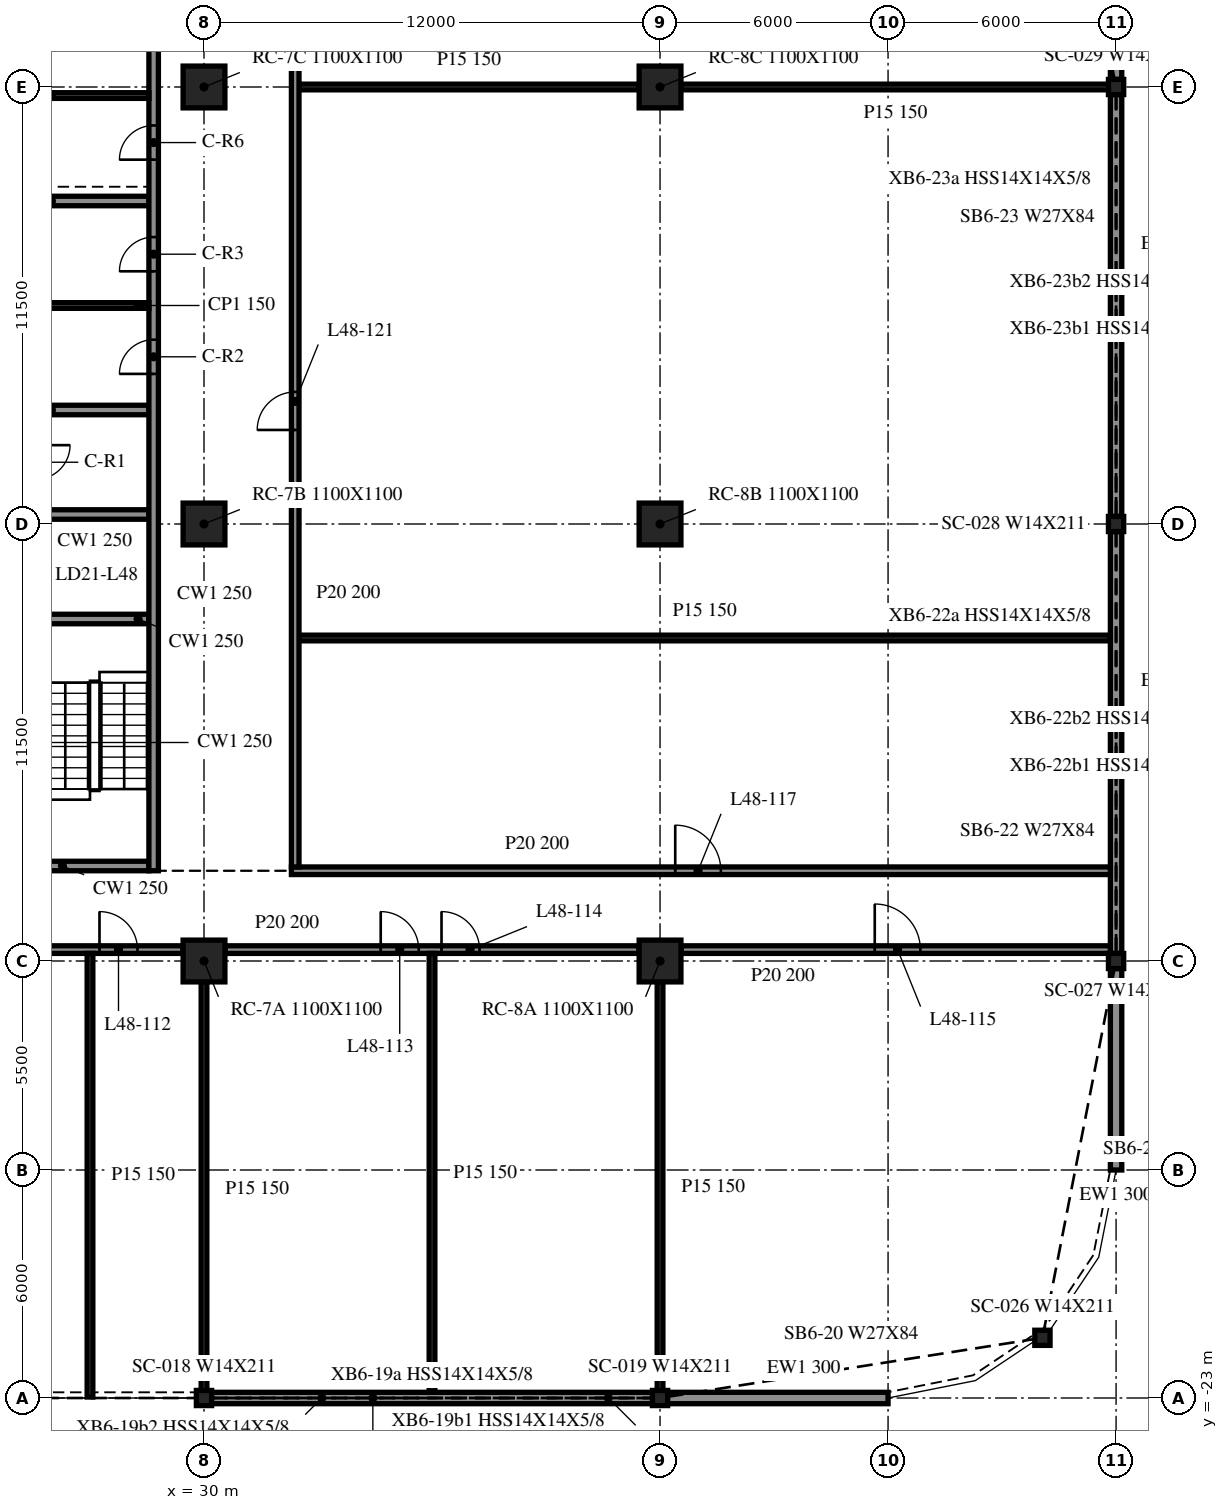
"""IFC4 building model, lengths in metres.
Left out: names, types, materials, properties, quantities, classifications, styles, units other than length and angle.
Written with IfcOpenShell. Run it as: python <this file> out.ifc"""

import sys

from ifc_helpers import new_model, si_unit, direction, frame, frame_2d, origin, origin_2d, place, context, subcontext, project, spatial, rectangle, i_section, extrude, element, fill, save


model = new_model("IFC4")
c1 = context("Model", 3, precision=1e-05, world=origin(), true_north=direction((0.0, 1.0)))
c2 = subcontext(c1, "Body", "Model", "MODEL_VIEW")
j1 = project(units=[si_unit("LENGTHUNIT", "METRE"), si_unit("PLANEANGLEUNIT", "RADIAN")], contexts=[c1])
p1 = place(None, origin())
s1 = spatial("IfcSite", under=j1, at=p1, CompositionType="ELEMENT")
p2 = place(p1, origin())
s2 = spatial("IfcBuilding", under=s1, at=p2, CompositionType="ELEMENT")
p3 = place(p2, frame((0.0, 0.0, 201.5)))
s3 = spatial("IfcBuildingStorey", under=s2, at=p3, CompositionType="ELEMENT", Elevation=201.5)
for number, where, z_axis, x_axis in (
    (1, (30.0, -11.5, -0.34), (0.0, 0.0, 1.0), (1.0, 0.0, 0.0)),
    (2, (30.0, 0.0, -0.34), (0.0, 0.0, 1.0), (1.0, 0.0, 0.0)),
    (3, (30.0, 11.5, -0.34), (0.0, 0.0, 1.0), (1.0, 0.0, 0.0)),
    (4, (42.0, -11.5, -0.34), (0.0, 0.0, 1.0), (1.0, 0.0, 0.0)),
    (5, (42.0, 0.0, -0.34), (0.0, 0.0, 1.0), (1.0, 0.0, 0.0)),
    (6, (42.0, 11.5, -0.34), (0.0, 0.0, 1.0), (1.0, 0.0, 0.0)),
):
    element("IfcColumn", number, at=place(p3, frame(where, z_axis=z_axis, x_axis=x_axis)), inside=s3, PredefinedType="COLUMN", context=c2, shape_type="SweptSolid", body=[
        extrude(rectangle(XDim=1.1, YDim=1.1, at=origin_2d()), origin(), (0.0, 0.0, 1.0), 3.8),
    ])
for number, where, z_axis, x_axis in (
    (7, (30.0, -23.0, -0.34), (0.0, 0.0, 1.0), (1.0, 0.0, 0.0)),
    (8, (42.0, -23.0, -0.34), (0.0, 0.0, 1.0), (1.0, 0.0, 0.0)),
    (9, (52.062, -21.416, -0.34), (0.0, 0.0, 1.0), (1.0, 0.0, 0.0)),
    (10, (54.0, -11.5, -0.34), (0.0, 0.0, 1.0), (1.0, 0.0, 0.0)),
    (11, (54.0, 0.0, -0.34), (0.0, 0.0, 1.0), (1.0, 0.0, 0.0)),
    (12, (54.0, 11.5, -0.34), (0.0, 0.0, 1.0), (1.0, 0.0, 0.0)),
):
    element("IfcColumn", number, at=place(p3, frame(where, z_axis=z_axis, x_axis=x_axis)), inside=s3, PredefinedType="COLUMN", context=c2, shape_type="SweptSolid", body=[
        extrude(i_section(OverallWidth=0.401, OverallDepth=0.399, WebThickness=0.025, FlangeThickness=0.04, at=origin_2d()), origin(), (0.0, 0.0, 1.0), 3.8),
    ])
p4 = place(p3, frame((30.012, -23.0, 0.0), z_axis=(0.0, 0.0, 1.0), x_axis=(1.0, 0.0, 0.0)))
e13 = element("IfcWall", 13, at=p4, inside=s3, PredefinedType="NOTDEFINED", context=c2, shape_type="SweptSolid", body=[
    extrude(rectangle(XDim=11.975, YDim=0.3, at=frame_2d((5.988, 0.0))), origin(), (0.0, 0.0, 1.0), 2.782),
])
p5 = place(p3, frame((42.012, -23.0, 0.0), z_axis=(0.0, 0.0, 1.0), x_axis=(1.0, 0.0, 0.0)))
e14 = element("IfcWall", 14, at=p5, inside=s3, PredefinedType="NOTDEFINED", context=c2, shape_type="SweptSolid", body=[
    extrude(rectangle(XDim=5.988, YDim=0.3, at=frame_2d((2.994, 0.0))), origin(), (0.0, 0.0, 1.0), 2.782),
])
p6 = place(p3, frame((54.0, -17.0, 0.0), z_axis=(0.0, 0.0, 1.0), x_axis=(0.0, 1.0, 0.0)))
e15 = element("IfcWall", 15, at=p6, inside=s3, PredefinedType="NOTDEFINED", context=c2, shape_type="SweptSolid", body=[
    extrude(rectangle(XDim=5.3, YDim=0.3, at=frame_2d((2.65, 0.0))), origin(), (0.0, 0.0, 1.0), 2.782),
])
for number, where, z_axis, x_axis in (
    (16, (54.0, -11.3, 0.0), (0.0, 0.0, 1.0), (0.0, 1.0, 0.0)),
    (17, (54.0, 0.2, 0.0), (0.0, 0.0, 1.0), (0.0, 1.0, 0.0)),
):
    element("IfcWall", number, at=place(p3, frame(where, z_axis=z_axis, x_axis=x_axis)), inside=s3, PredefinedType="NOTDEFINED", context=c2, shape_type="SweptSolid", body=[
        extrude(rectangle(XDim=11.1, YDim=0.3, at=frame_2d((5.55, 0.0))), origin(), (0.0, 0.0, 1.0), 2.782),
    ])
p7 = place(p3, frame((54.0, 11.7, 0.0), z_axis=(0.0, 0.0, 1.0), x_axis=(0.0, 1.0, 0.0)))
e18 = element("IfcWall", 18, at=p7, inside=s3, PredefinedType="NOTDEFINED", context=c2, shape_type="SweptSolid", body=[
    extrude(rectangle(XDim=5.3, YDim=0.3, at=frame_2d((2.65, 0.0))), origin(), (0.0, 0.0, 1.0), 2.782),
])
p8 = place(p3, frame((28.675, -9.125, 0.0), z_axis=(0.0, 0.0, 1.0), x_axis=(0.0, 1.0, 0.0)))
e19 = element("IfcWall", 19, at=p8, inside=s3, PredefinedType="SOLIDWALL", context=c2, shape_type="SweptSolid", body=[
    extrude(rectangle(XDim=24.25, YDim=0.25, at=frame_2d((12.125, 0.0))), origin(), (0.0, 0.0, 1.0), 3.46),
])
p9 = place(p8, frame((13.075, 0.0, 0.0)))
e20 = element("IfcOpeningElement", 20, at=p9, cuts=e19, PredefinedType="OPENING", context=c2, shape_type="SweptSolid", body=[
    extrude(rectangle(XDim=0.9, YDim=2.1, at=frame_2d((0.45, 1.05))), frame((0.0, 0.135, 0.0), z_axis=(0.0, -1.0, 0.0), x_axis=(1.0, 0.0, 0.0)), (0.0, 0.0, 1.0), 0.27),
])
p10 = place(p8, frame((15.775, 0.0, 0.0)))
e21 = element("IfcOpeningElement", 21, at=p10, cuts=e19, PredefinedType="OPENING", context=c2, shape_type="SweptSolid", body=[
    extrude(rectangle(XDim=0.9, YDim=2.1, at=frame_2d((0.45, 1.05))), frame((0.0, 0.135, 0.0), z_axis=(0.0, -1.0, 0.0), x_axis=(1.0, 0.0, 0.0)), (0.0, 0.0, 1.0), 0.27),
])
p11 = place(p8, frame((18.712, 0.0, 0.0)))
e22 = element("IfcOpeningElement", 22, at=p11, cuts=e19, PredefinedType="OPENING", context=c2, shape_type="SweptSolid", body=[
    extrude(rectangle(XDim=0.9, YDim=2.1, at=frame_2d((0.45, 1.05))), frame((0.0, 0.135, 0.0), z_axis=(0.0, -1.0, 0.0), x_axis=(1.0, 0.0, 0.0)), (0.0, 0.0, 1.0), 0.27),
])
p12 = place(p8, frame((21.788, 0.0, 0.0)))
e23 = element("IfcOpeningElement", 23, at=p12, cuts=e19, PredefinedType="OPENING", context=c2, shape_type="SweptSolid", body=[
    extrude(rectangle(XDim=0.9, YDim=2.1, at=frame_2d((0.45, 1.05))), frame((0.0, 0.135, 0.0), z_axis=(0.0, -1.0, 0.0), x_axis=(1.0, 0.0, 0.0)), (0.0, 0.0, 1.0), 0.27),
])
p13 = place(p3, frame((28.55, -9.0, 0.0), z_axis=(0.0, 0.0, 1.0), x_axis=(-1.0, 0.0, 0.0)))
e24 = element("IfcWall", 24, at=p13, inside=s3, PredefinedType="SOLIDWALL", context=c2, shape_type="SweptSolid", body=[
    extrude(rectangle(XDim=9.1, YDim=0.25, at=frame_2d((4.55, 0.0))), origin(), (0.0, 0.0, 1.0), 3.46),
])
p14 = place(p13, frame((3.65, 0.0, 0.0)))
e25 = element("IfcOpeningElement", 25, at=p14, cuts=e24, PredefinedType="OPENING", context=c2, shape_type="SweptSolid", body=[
    extrude(rectangle(XDim=1.8, YDim=2.1, at=frame_2d((0.9, 1.05))), frame((0.0, 0.135, 0.0), z_axis=(0.0, -1.0, 0.0), x_axis=(1.0, 0.0, 0.0)), (0.0, 0.0, 1.0), 0.27),
])
for number, where, z_axis, x_axis in (
    (26, (25.7, -2.5, 0.0), (0.0, 0.0, 1.0), (1.0, 0.0, 0.0)),
    (27, (25.7, 0.25, 0.0), (0.0, 0.0, 1.0), (1.0, 0.0, 0.0)),
    (28, (25.7, 3.0, 0.0), (0.0, 0.0, 1.0), (1.0, 0.0, 0.0)),
    (29, (25.7, 8.5, 0.0), (0.0, 0.0, 1.0), (1.0, 0.0, 0.0)),
):
    element("IfcWall", number, at=place(p3, frame(where, z_axis=z_axis, x_axis=x_axis)), inside=s3, PredefinedType="SOLIDWALL", context=c2, shape_type="SweptSolid", body=[
        extrude(rectangle(XDim=2.85, YDim=0.25, at=frame_2d((1.425, 0.0))), origin(), (0.0, 0.0, 1.0), 3.46),
    ])
for number, where, z_axis, x_axis in (
    (30, (25.7, 5.75, 0.0), (0.0, 0.0, 1.0), (1.0, 0.0, 0.0)),
    (31, (25.7, 11.275, 0.0), (0.0, 0.0, 1.0), (1.0, 0.0, 0.0)),
):
    element("IfcWall", number, at=place(p3, frame(where, z_axis=z_axis, x_axis=x_axis)), inside=s3, PredefinedType="PARTITIONING", context=c2, shape_type="SweptSolid", body=[
        extrude(rectangle(XDim=2.85, YDim=0.15, at=frame_2d((1.425, 0.0))), origin(), (0.0, 0.0, 1.0), 3.46),
    ])
p15 = place(p3, frame((18.55, -11.2, 0.0), z_axis=(0.0, 0.0, 1.0), x_axis=(1.0, 0.0, 0.0)))
e32 = element("IfcWall", 32, at=p15, inside=s3, PredefinedType="PARTITIONING", context=c2, shape_type="SweptSolid", body=[
    extrude(rectangle(XDim=10.9, YDim=0.2, at=frame_2d((5.45, 0.0))), origin(), (0.0, 0.0, 1.0), 3.46),
])
p16 = place(p15, frame((4.9, 0.0, 0.0)))
e33 = element("IfcOpeningElement", 33, at=p16, cuts=e32, PredefinedType="OPENING", context=c2, shape_type="SweptSolid", body=[
    extrude(rectangle(XDim=1.2, YDim=2.1, at=frame_2d((0.6, 1.05))), frame((0.0, 0.11, 0.0), z_axis=(0.0, -1.0, 0.0), x_axis=(1.0, 0.0, 0.0)), (0.0, 0.0, 1.0), 0.22),
])
p17 = place(p15, frame((8.7, 0.0, 0.0)))
e34 = element("IfcOpeningElement", 34, at=p17, cuts=e32, PredefinedType="OPENING", context=c2, shape_type="SweptSolid", body=[
    extrude(rectangle(XDim=1.0, YDim=2.1, at=frame_2d((0.5, 1.05))), frame((0.0, 0.11, 0.0), z_axis=(0.0, -1.0, 0.0), x_axis=(1.0, 0.0, 0.0)), (0.0, 0.0, 1.0), 0.22),
])
p18 = place(p3, frame((30.55, -11.2, 0.0), z_axis=(0.0, 0.0, 1.0), x_axis=(1.0, 0.0, 0.0)))
e35 = element("IfcWall", 35, at=p18, inside=s3, PredefinedType="PARTITIONING", context=c2, shape_type="SweptSolid", body=[
    extrude(rectangle(XDim=10.9, YDim=0.2, at=frame_2d((5.45, 0.0))), origin(), (0.0, 0.0, 1.0), 3.46),
])
p19 = place(p18, frame((4.1, 0.0, 0.0)))
e36 = element("IfcOpeningElement", 36, at=p19, cuts=e35, PredefinedType="OPENING", context=c2, shape_type="SweptSolid", body=[
    extrude(rectangle(XDim=1.0, YDim=2.1, at=frame_2d((0.5, 1.05))), frame((0.0, 0.11, 0.0), z_axis=(0.0, -1.0, 0.0), x_axis=(1.0, 0.0, 0.0)), (0.0, 0.0, 1.0), 0.22),
])
p20 = place(p18, frame((5.7, 0.0, 0.0)))
e37 = element("IfcOpeningElement", 37, at=p20, cuts=e35, PredefinedType="OPENING", context=c2, shape_type="SweptSolid", body=[
    extrude(rectangle(XDim=1.0, YDim=2.1, at=frame_2d((0.5, 1.05))), frame((0.0, 0.11, 0.0), z_axis=(0.0, -1.0, 0.0), x_axis=(1.0, 0.0, 0.0)), (0.0, 0.0, 1.0), 0.22),
])
p21 = place(p3, frame((42.55, -11.2, 0.0), z_axis=(0.0, 0.0, 1.0), x_axis=(1.0, 0.0, 0.0)))
e38 = element("IfcWall", 38, at=p21, inside=s3, PredefinedType="PARTITIONING", context=c2, shape_type="SweptSolid", body=[
    extrude(rectangle(XDim=11.3, YDim=0.2, at=frame_2d((5.65, 0.0))), origin(), (0.0, 0.0, 1.0), 3.46),
])
p22 = place(p21, frame((5.1, 0.0, 0.0)))
e39 = element("IfcOpeningElement", 39, at=p22, cuts=e38, PredefinedType="OPENING", context=c2, shape_type="SweptSolid", body=[
    extrude(rectangle(XDim=1.2, YDim=2.1, at=frame_2d((0.6, 1.05))), frame((0.0, 0.11, 0.0), z_axis=(0.0, -1.0, 0.0), x_axis=(1.0, 0.0, 0.0)), (0.0, 0.0, 1.0), 0.22),
])
p23 = place(p3, frame((32.3, -9.125, 0.0), z_axis=(0.0, 0.0, 1.0), x_axis=(1.0, 0.0, 0.0)))
e40 = element("IfcWall", 40, at=p23, inside=s3, PredefinedType="PARTITIONING", context=c2, shape_type="SweptSolid", body=[
    extrude(rectangle(XDim=21.55, YDim=0.2, at=frame_2d((10.775, 0.0))), origin(), (0.0, 0.0, 1.0), 3.46),
])
p24 = place(p23, frame((10.1, 0.0, 0.0)))
e41 = element("IfcOpeningElement", 41, at=p24, cuts=e40, PredefinedType="OPENING", context=c2, shape_type="SweptSolid", body=[
    extrude(rectangle(XDim=1.2, YDim=2.1, at=frame_2d((0.6, 1.05))), frame((0.0, 0.11, 0.0), z_axis=(0.0, -1.0, 0.0), x_axis=(1.0, 0.0, 0.0)), (0.0, 0.0, 1.0), 0.22),
])
p25 = place(p3, frame((32.5, -3.0, 0.0), z_axis=(0.0, 0.0, 1.0), x_axis=(1.0, 0.0, 0.0)))
e42 = element("IfcWall", 42, at=p25, inside=s3, PredefinedType="PARTITIONING", context=c2, shape_type="SweptSolid", body=[
    extrude(rectangle(XDim=21.35, YDim=0.15, at=frame_2d((10.675, 0.0))), origin(), (0.0, 0.0, 1.0), 3.46),
])
p26 = place(p3, frame((32.5, 11.5, 0.0), z_axis=(0.0, 0.0, 1.0), x_axis=(1.0, 0.0, 0.0)))
e43 = element("IfcWall", 43, at=p26, inside=s3, PredefinedType="PARTITIONING", context=c2, shape_type="SweptSolid", body=[
    extrude(rectangle(XDim=8.95, YDim=0.15, at=frame_2d((4.475, 0.0))), origin(), (0.0, 0.0, 1.0), 3.46),
])
p27 = place(p3, frame((42.55, 11.5, 0.0), z_axis=(0.0, 0.0, 1.0), x_axis=(1.0, 0.0, 0.0)))
e44 = element("IfcWall", 44, at=p27, inside=s3, PredefinedType="PARTITIONING", context=c2, shape_type="SweptSolid", body=[
    extrude(rectangle(XDim=11.3, YDim=0.15, at=frame_2d((5.65, 0.0))), origin(), (0.0, 0.0, 1.0), 3.46),
])
p28 = place(p3, frame((27.0, -22.975, 0.0), z_axis=(0.0, 0.0, 1.0), x_axis=(0.0, 1.0, 0.0)))
e45 = element("IfcWall", 45, at=p28, inside=s3, PredefinedType="PARTITIONING", context=c2, shape_type="SweptSolid", body=[
    extrude(rectangle(XDim=11.675, YDim=0.15, at=frame_2d((5.837, 0.0))), origin(), (0.0, 0.0, 1.0), 3.46),
])
p29 = place(p3, frame((30.0, -22.975, 0.0), z_axis=(0.0, 0.0, 1.0), x_axis=(0.0, 1.0, 0.0)))
e46 = element("IfcWall", 46, at=p29, inside=s3, PredefinedType="PARTITIONING", context=c2, shape_type="SweptSolid", body=[
    extrude(rectangle(XDim=10.925, YDim=0.15, at=frame_2d((5.462, 0.0))), origin(), (0.0, 0.0, 1.0), 3.46),
])
p30 = place(p3, frame((32.4, -9.025, 0.0), z_axis=(0.0, 0.0, 1.0), x_axis=(0.0, 1.0, 0.0)))
e47 = element("IfcWall", 47, at=p30, inside=s3, PredefinedType="PARTITIONING", context=c2, shape_type="SweptSolid", body=[
    extrude(rectangle(XDim=24.05, YDim=0.2, at=frame_2d((12.025, 0.0))), origin(), (0.0, 0.0, 1.0), 3.46),
])
p31 = place(p30, frame((11.5, 0.0, 0.0)))
e48 = element("IfcOpeningElement", 48, at=p31, cuts=e47, PredefinedType="OPENING", context=c2, shape_type="SweptSolid", body=[
    extrude(rectangle(XDim=1.0, YDim=2.1, at=frame_2d((0.5, 1.05))), frame((0.0, 0.11, 0.0), z_axis=(0.0, -1.0, 0.0), x_axis=(1.0, 0.0, 0.0)), (0.0, 0.0, 1.0), 0.22),
])
p32 = place(p3, frame((36.0, -22.85, 0.0), z_axis=(0.0, 0.0, 1.0), x_axis=(0.0, 1.0, 0.0)))
e49 = element("IfcWall", 49, at=p32, inside=s3, PredefinedType="PARTITIONING", context=c2, shape_type="SweptSolid", body=[
    extrude(rectangle(XDim=11.55, YDim=0.15, at=frame_2d((5.775, 0.0))), origin(), (0.0, 0.0, 1.0), 3.46),
])
p33 = place(p3, frame((42.0, -22.85, 0.0), z_axis=(0.0, 0.0, 1.0), x_axis=(0.0, 1.0, 0.0)))
e50 = element("IfcWall", 50, at=p33, inside=s3, PredefinedType="PARTITIONING", context=c2, shape_type="SweptSolid", body=[
    extrude(rectangle(XDim=10.8, YDim=0.15, at=frame_2d((5.4, 0.0))), origin(), (0.0, 0.0, 1.0), 3.46),
])
p34 = place(p9, origin())
e51 = element("IfcDoor", 51, at=p34, inside=s3, OperationType="SINGLE_SWING_RIGHT", PredefinedType="DOOR", context=c2, shape_type="SweptSolid", body=[
    extrude(rectangle(XDim=0.9, YDim=2.1, at=frame_2d((0.45, 1.05))), frame((0.0, 0.025, 0.0), z_axis=(0.0, -1.0, 0.0), x_axis=(1.0, 0.0, 0.0)), (0.0, 0.0, 1.0), 0.05),
])
fill(e20, e51)
p35 = place(p10, origin())
e52 = element("IfcDoor", 52, at=p35, inside=s3, OperationType="SINGLE_SWING_LEFT", PredefinedType="DOOR", context=c2, shape_type="SweptSolid", body=[
    extrude(rectangle(XDim=0.9, YDim=2.1, at=frame_2d((0.45, 1.05))), frame((0.0, 0.025, 0.0), z_axis=(0.0, -1.0, 0.0), x_axis=(1.0, 0.0, 0.0)), (0.0, 0.0, 1.0), 0.05),
])
fill(e21, e52)
p36 = place(p11, origin())
e53 = element("IfcDoor", 53, at=p36, inside=s3, OperationType="SINGLE_SWING_RIGHT", PredefinedType="DOOR", context=c2, shape_type="SweptSolid", body=[
    extrude(rectangle(XDim=0.9, YDim=2.1, at=frame_2d((0.45, 1.05))), frame((0.0, 0.025, 0.0), z_axis=(0.0, -1.0, 0.0), x_axis=(1.0, 0.0, 0.0)), (0.0, 0.0, 1.0), 0.05),
])
fill(e22, e53)
p37 = place(p17, origin())
e54 = element("IfcDoor", 54, at=p37, inside=s3, OperationType="SINGLE_SWING_LEFT", PredefinedType="DOOR", context=c2, shape_type="SweptSolid", body=[
    extrude(rectangle(XDim=1.0, YDim=2.1, at=frame_2d((0.5, 1.05))), frame((0.0, 0.025, 0.0), z_axis=(0.0, -1.0, 0.0), x_axis=(1.0, 0.0, 0.0)), (0.0, 0.0, 1.0), 0.05),
])
fill(e34, e54)
p38 = place(p19, origin())
e55 = element("IfcDoor", 55, at=p38, inside=s3, OperationType="SINGLE_SWING_RIGHT", PredefinedType="DOOR", context=c2, shape_type="SweptSolid", body=[
    extrude(rectangle(XDim=1.0, YDim=2.1, at=frame_2d((0.5, 1.05))), frame((0.0, 0.025, 0.0), z_axis=(0.0, -1.0, 0.0), x_axis=(1.0, 0.0, 0.0)), (0.0, 0.0, 1.0), 0.05),
])
fill(e36, e55)
p39 = place(p20, origin())
e56 = element("IfcDoor", 56, at=p39, inside=s3, OperationType="SINGLE_SWING_LEFT", PredefinedType="DOOR", context=c2, shape_type="SweptSolid", body=[
    extrude(rectangle(XDim=1.0, YDim=2.1, at=frame_2d((0.5, 1.05))), frame((0.0, 0.025, 0.0), z_axis=(0.0, -1.0, 0.0), x_axis=(1.0, 0.0, 0.0)), (0.0, 0.0, 1.0), 0.05),
])
fill(e37, e56)
p40 = place(p22, origin())
e57 = element("IfcDoor", 57, at=p40, inside=s3, OperationType="SINGLE_SWING_LEFT", PredefinedType="DOOR", context=c2, shape_type="SweptSolid", body=[
    extrude(rectangle(XDim=1.2, YDim=2.1, at=frame_2d((0.6, 1.05))), frame((0.0, 0.025, 0.0), z_axis=(0.0, -1.0, 0.0), x_axis=(1.0, 0.0, 0.0)), (0.0, 0.0, 1.0), 0.05),
])
fill(e39, e57)
p41 = place(p24, origin())
e58 = element("IfcDoor", 58, at=p41, inside=s3, OperationType="SINGLE_SWING_LEFT", PredefinedType="DOOR", context=c2, shape_type="SweptSolid", body=[
    extrude(rectangle(XDim=1.2, YDim=2.1, at=frame_2d((0.6, 1.05))), frame((0.0, 0.025, 0.0), z_axis=(0.0, -1.0, 0.0), x_axis=(1.0, 0.0, 0.0)), (0.0, 0.0, 1.0), 0.05),
])
fill(e41, e58)
p42 = place(p31, origin())
e59 = element("IfcDoor", 59, at=p42, inside=s3, OperationType="SINGLE_SWING_RIGHT", PredefinedType="DOOR", context=c2, shape_type="SweptSolid", body=[
    extrude(rectangle(XDim=1.0, YDim=2.1, at=frame_2d((0.5, 1.05))), frame((0.0, 0.025, 0.0), z_axis=(0.0, -1.0, 0.0), x_axis=(1.0, 0.0, 0.0)), (0.0, 0.0, 1.0), 0.05),
])
fill(e48, e59)
save(model, sys.argv[1])
